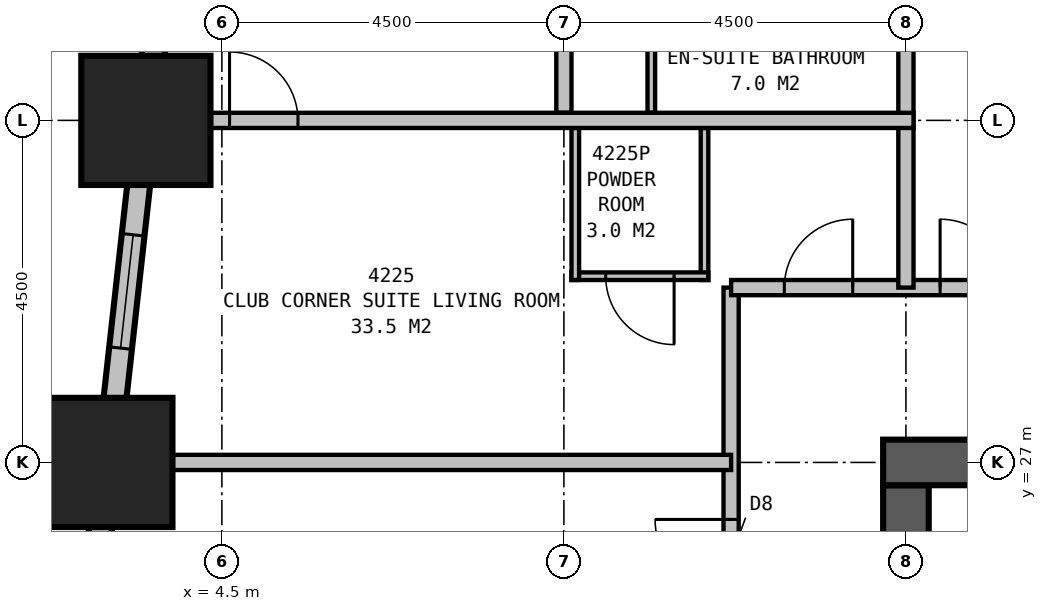
"""IFC4 building model, lengths in metres.
Left out: names, types, materials, properties, quantities, classifications, styles, units other than length and angle.
Written with IfcOpenShell. Run it as: python <this file> out.ifc"""

import sys

from ifc_helpers import new_model, si_unit, direction, frame, frame_2d, origin, origin_2d, place, context, subcontext, project, spatial, rectangle, extrude, element, fill, save


model = new_model("IFC4")
c1 = context("Model", 3, precision=1e-05, world=origin(), true_north=direction((0.0, 1.0)))
c2 = subcontext(c1, "Body", "Model", "MODEL_VIEW")
j1 = project(units=[si_unit("LENGTHUNIT", "METRE"), si_unit("PLANEANGLEUNIT", "RADIAN")], contexts=[c1])
p1 = place(None, origin())
s1 = spatial("IfcSite", under=j1, at=p1, CompositionType="ELEMENT")
p2 = place(p1, origin())
s2 = spatial("IfcBuilding", under=s1, at=p2, CompositionType="ELEMENT")
p3 = place(p2, frame((0.0, 0.0, 165.9)))
s3 = spatial("IfcBuildingStorey", under=s2, at=p3, CompositionType="ELEMENT", Elevation=165.9)
for number, where, z_axis, x_axis in (
    (1, (3.5, 31.5, 0.0), (0.0, 0.0, 1.0), (1.0, 0.0, 0.0)),
    (2, (3.0, 27.0, 0.0), (0.0, 0.0, 1.0), (1.0, 0.0, 0.0)),
):
    element("IfcColumn", number, at=place(p3, frame(where, z_axis=z_axis, x_axis=x_axis)), inside=s3, PredefinedType="COLUMN", context=c2, shape_type="SweptSolid", body=[
        extrude(rectangle(XDim=1.7, YDim=1.7, at=origin_2d()), origin(), (0.0, 0.0, 1.0), 3.5),
    ])
p4 = place(p3, frame((36.3, 27.0, 0.0), z_axis=(0.0, 0.0, 1.0), x_axis=(-1.0, 0.0, 0.0)))
e3 = element("IfcWall", 3, at=p4, inside=s3, PredefinedType="SHEAR", context=c2, shape_type="SweptSolid", body=[
    extrude(rectangle(XDim=23.1, YDim=0.6, at=frame_2d((11.55, 0.0))), origin(), (0.0, 0.0, 1.0), 3.5),
])
p5 = place(p4, frame((17.05, 0.0, 0.0)))
e4 = element("IfcOpeningElement", 4, at=p5, cuts=e3, PredefinedType="OPENING", context=c2, shape_type="SweptSolid", body=[
    extrude(rectangle(XDim=1.0, YDim=2.1, at=frame_2d((0.5, 1.05))), frame((0.0, 0.31, 0.0), z_axis=(0.0, -1.0, 0.0), x_axis=(1.0, 0.0, 0.0)), (0.0, 0.0, 1.0), 0.62),
])
p6 = place(p4, frame((12.05, 0.0, 0.0)))
e5 = element("IfcOpeningElement", 5, at=p6, cuts=e3, PredefinedType="OPENING", context=c2, shape_type="SweptSolid", body=[
    extrude(rectangle(XDim=1.0, YDim=2.1, at=frame_2d((0.5, 1.05))), frame((0.0, 0.31, 0.0), z_axis=(0.0, -1.0, 0.0), x_axis=(1.0, 0.0, 0.0)), (0.0, 0.0, 1.0), 0.62),
])
p7 = place(p4, frame((7.05, 0.0, 0.0)))
e6 = element("IfcOpeningElement", 6, at=p7, cuts=e3, PredefinedType="OPENING", context=c2, shape_type="SweptSolid", body=[
    extrude(rectangle(XDim=1.0, YDim=2.1, at=frame_2d((0.5, 1.05))), frame((0.0, 0.31, 0.0), z_axis=(0.0, -1.0, 0.0), x_axis=(1.0, 0.0, 0.0)), (0.0, 0.0, 1.0), 0.62),
])
p8 = place(p3, frame((13.5, 26.7, 0.0), z_axis=(0.0, 0.0, 1.0), x_axis=(0.0, -1.0, 0.0)))
e7 = element("IfcWall", 7, at=p8, inside=s3, PredefinedType="SHEAR", context=c2, shape_type="SweptSolid", body=[
    extrude(rectangle(XDim=6.7, YDim=0.6, at=frame_2d((3.35, 0.0))), origin(), (0.0, 0.0, 1.0), 3.5),
])
p9 = place(p3, frame((4.017, 36.149, 0.0), z_axis=(0.0, 0.0, 1.0), x_axis=(-0.110433862387, -0.993883475081, 0.0)))
e8 = element("IfcWall", 8, at=p9, inside=s3, PredefinedType="STANDARD", context=c2, shape_type="SweptSolid", body=[
    extrude(rectangle(XDim=22.939, YDim=0.3, at=frame_2d((11.469, 0.0))), origin(), (0.0, 0.0, 1.0), 2.25),
])
p10 = place(p9, frame((1.664, 0.0, 0.5)))
e9 = element("IfcOpeningElement", 9, at=p10, cuts=e8, PredefinedType="OPENING", context=c2, shape_type="SweptSolid", body=[
    extrude(rectangle(XDim=1.5, YDim=1.6, at=frame_2d((0.75, 0.8))), frame((0.0, 0.16, 0.0), z_axis=(0.0, -1.0, 0.0), x_axis=(1.0, 0.0, 0.0)), (0.0, 0.0, 1.0), 0.32),
])
p11 = place(p9, frame((6.192, 0.0, 0.5)))
e10 = element("IfcOpeningElement", 10, at=p11, cuts=e8, PredefinedType="OPENING", context=c2, shape_type="SweptSolid", body=[
    extrude(rectangle(XDim=1.5, YDim=1.6, at=frame_2d((0.75, 0.8))), frame((0.0, 0.16, 0.0), z_axis=(0.0, -1.0, 0.0), x_axis=(1.0, 0.0, 0.0)), (0.0, 0.0, 1.0), 0.32),
])
p12 = place(p9, frame((10.719, 0.0, 0.5)))
e11 = element("IfcOpeningElement", 11, at=p12, cuts=e8, PredefinedType="OPENING", context=c2, shape_type="SweptSolid", body=[
    extrude(rectangle(XDim=1.5, YDim=1.6, at=frame_2d((0.75, 0.8))), frame((0.0, 0.16, 0.0), z_axis=(0.0, -1.0, 0.0), x_axis=(1.0, 0.0, 0.0)), (0.0, 0.0, 1.0), 0.32),
])
p13 = place(p9, frame((15.247, 0.0, 0.5)))
e12 = element("IfcOpeningElement", 12, at=p13, cuts=e8, PredefinedType="OPENING", context=c2, shape_type="SweptSolid", body=[
    extrude(rectangle(XDim=1.5, YDim=1.6, at=frame_2d((0.75, 0.8))), frame((0.0, 0.16, 0.0), z_axis=(0.0, -1.0, 0.0), x_axis=(1.0, 0.0, 0.0)), (0.0, 0.0, 1.0), 0.32),
])
p14 = place(p9, frame((19.775, 0.0, 0.5)))
e13 = element("IfcOpeningElement", 13, at=p14, cuts=e8, PredefinedType="OPENING", context=c2, shape_type="SweptSolid", body=[
    extrude(rectangle(XDim=1.5, YDim=1.6, at=frame_2d((0.75, 0.8))), frame((0.0, 0.16, 0.0), z_axis=(0.0, -1.0, 0.0), x_axis=(1.0, 0.0, 0.0)), (0.0, 0.0, 1.0), 0.32),
])
p15 = place(p3, frame((11.2, 29.3, 0.0), z_axis=(0.0, 0.0, 1.0), x_axis=(1.0, 0.0, 0.0)))
e14 = element("IfcWall", 14, at=p15, inside=s3, PredefinedType="PARTITIONING", context=c2, shape_type="SweptSolid", body=[
    extrude(rectangle(XDim=27.1, YDim=0.2, at=frame_2d((13.55, 0.0))), origin(), (0.0, 0.0, 1.0), 3.25),
])
p16 = place(p15, frame((2.75, 0.0, 0.0)))
e15 = element("IfcOpeningElement", 15, at=p16, cuts=e14, PredefinedType="OPENING", context=c2, shape_type="SweptSolid", body=[
    extrude(rectangle(XDim=0.9, YDim=2.1, at=frame_2d((0.45, 1.05))), frame((0.0, 0.11, 0.0), z_axis=(0.0, -1.0, 0.0), x_axis=(1.0, 0.0, 0.0)), (0.0, 0.0, 1.0), 0.22),
])
p17 = place(p15, frame((9.55, 0.0, 0.0)))
e16 = element("IfcOpeningElement", 16, at=p17, cuts=e14, PredefinedType="OPENING", context=c2, shape_type="SweptSolid", body=[
    extrude(rectangle(XDim=0.9, YDim=2.1, at=frame_2d((0.45, 1.05))), frame((0.0, 0.11, 0.0), z_axis=(0.0, -1.0, 0.0), x_axis=(1.0, 0.0, 0.0)), (0.0, 0.0, 1.0), 0.22),
])
p18 = place(p15, frame((16.25, 0.0, 0.0)))
e17 = element("IfcOpeningElement", 17, at=p18, cuts=e14, PredefinedType="OPENING", context=c2, shape_type="SweptSolid", body=[
    extrude(rectangle(XDim=0.9, YDim=2.1, at=frame_2d((0.45, 1.05))), frame((0.0, 0.11, 0.0), z_axis=(0.0, -1.0, 0.0), x_axis=(1.0, 0.0, 0.0)), (0.0, 0.0, 1.0), 0.22),
])
p19 = place(p15, frame((20.75, 0.0, 0.0)))
e18 = element("IfcOpeningElement", 18, at=p19, cuts=e14, PredefinedType="OPENING", context=c2, shape_type="SweptSolid", body=[
    extrude(rectangle(XDim=0.9, YDim=2.1, at=frame_2d((0.45, 1.05))), frame((0.0, 0.11, 0.0), z_axis=(0.0, -1.0, 0.0), x_axis=(1.0, 0.0, 0.0)), (0.0, 0.0, 1.0), 0.22),
])
p20 = place(p15, frame((25.5, 0.0, 0.0)))
e19 = element("IfcOpeningElement", 19, at=p20, cuts=e14, PredefinedType="OPENING", context=c2, shape_type="SweptSolid", body=[
    extrude(rectangle(XDim=0.9, YDim=2.1, at=frame_2d((0.45, 1.05))), frame((0.0, 0.11, 0.0), z_axis=(0.0, -1.0, 0.0), x_axis=(1.0, 0.0, 0.0)), (0.0, 0.0, 1.0), 0.22),
])
p21 = place(p15, frame((0.7, 0.0, 0.0)))
e20 = element("IfcOpeningElement", 20, at=p21, cuts=e14, PredefinedType="OPENING", context=c2, shape_type="SweptSolid", body=[
    extrude(rectangle(XDim=0.9, YDim=2.1, at=frame_2d((0.45, 1.05))), frame((0.0, 0.11, 0.0), z_axis=(0.0, -1.0, 0.0), x_axis=(1.0, 0.0, 0.0)), (0.0, 0.0, 1.0), 0.22),
])
p22 = place(p3, frame((11.2, 10.6, 0.0), z_axis=(0.0, 0.0, 1.0), x_axis=(0.0, 1.0, 0.0)))
e21 = element("IfcWall", 21, at=p22, inside=s3, PredefinedType="PARTITIONING", context=c2, shape_type="SweptSolid", body=[
    extrude(rectangle(XDim=18.7, YDim=0.2, at=frame_2d((9.35, 0.0))), origin(), (0.0, 0.0, 1.0), 3.25),
])
p23 = place(p22, frame((6.05, 0.0, 0.0)))
e22 = element("IfcOpeningElement", 22, at=p23, cuts=e21, PredefinedType="OPENING", context=c2, shape_type="SweptSolid", body=[
    extrude(rectangle(XDim=0.9, YDim=2.1, at=frame_2d((0.45, 1.05))), frame((0.0, 0.11, 0.0), z_axis=(0.0, -1.0, 0.0), x_axis=(1.0, 0.0, 0.0)), (0.0, 0.0, 1.0), 0.22),
])
p24 = place(p22, frame((10.55, 0.0, 0.0)))
e23 = element("IfcOpeningElement", 23, at=p24, cuts=e21, PredefinedType="OPENING", context=c2, shape_type="SweptSolid", body=[
    extrude(rectangle(XDim=0.9, YDim=2.1, at=frame_2d((0.45, 1.05))), frame((0.0, 0.11, 0.0), z_axis=(0.0, -1.0, 0.0), x_axis=(1.0, 0.0, 0.0)), (0.0, 0.0, 1.0), 0.22),
])
p25 = place(p22, frame((14.65, 0.0, 0.0)))
e24 = element("IfcOpeningElement", 24, at=p25, cuts=e21, PredefinedType="OPENING", context=c2, shape_type="SweptSolid", body=[
    extrude(rectangle(XDim=1.0, YDim=2.1, at=frame_2d((0.5, 1.05))), frame((0.0, 0.11, 0.0), z_axis=(0.0, -1.0, 0.0), x_axis=(1.0, 0.0, 0.0)), (0.0, 0.0, 1.0), 0.22),
])
p26 = place(p3, frame((11.2, 27.0, 0.0), z_axis=(0.0, 0.0, 1.0), x_axis=(-1.0, 0.0, 0.0)))
e25 = element("IfcWall", 25, at=p26, inside=s3, PredefinedType="PARTITIONING", context=c2, shape_type="SweptSolid", body=[
    extrude(rectangle(XDim=7.977, YDim=0.2, at=frame_2d((3.988, 0.0))), origin(), (0.0, 0.0, 1.0), 1.95),
])
p27 = place(p3, frame((13.5, 29.3, 0.0), z_axis=(0.0, 0.0, 1.0), x_axis=(0.0, 1.0, 0.0)))
e26 = element("IfcWall", 26, at=p27, inside=s3, PredefinedType="PARTITIONING", context=c2, shape_type="SweptSolid", body=[
    extrude(rectangle(XDim=11.2, YDim=0.2, at=frame_2d((5.6, 0.0))), origin(), (0.0, 0.0, 1.0), 2.25),
])
p28 = place(p3, frame((13.6, 31.5, 0.0), z_axis=(0.0, 0.0, 1.0), x_axis=(-1.0, 0.0, 0.0)))
e27 = element("IfcWall", 27, at=p28, inside=s3, PredefinedType="PARTITIONING", context=c2, shape_type="SweptSolid", body=[
    extrude(rectangle(XDim=10.099, YDim=0.2, at=frame_2d((5.05, 0.0))), origin(), (0.0, 0.0, 1.0), 3.25),
])
p29 = place(p28, frame((8.999, 0.0, 0.0), z_axis=(0.0, 0.0, 1.0), x_axis=(-1.0, 0.0, 0.0)))
e28 = element("IfcOpeningElement", 28, at=p29, cuts=e27, PredefinedType="OPENING", context=c2, shape_type="SweptSolid", body=[
    extrude(rectangle(XDim=0.9, YDim=2.1, at=frame_2d((0.45, 1.05))), frame((0.0, 0.11, 0.0), z_axis=(0.0, -1.0, 0.0), x_axis=(1.0, 0.0, 0.0)), (0.0, 0.0, 1.0), 0.22),
])
p30 = place(p3, frame((9.15, 31.4, 0.0), z_axis=(0.0, 0.0, 1.0), x_axis=(0.0, -1.0, 0.0)))
e29 = element("IfcWall", 29, at=p30, inside=s3, PredefinedType="PLUMBINGWALL", context=c2, shape_type="SweptSolid", body=[
    extrude(rectangle(XDim=2.0, YDim=0.1, at=frame_2d((1.0, 0.0))), origin(), (0.0, 0.0, 1.0), 2.25),
])
p31 = place(p3, frame((10.85, 31.4, 0.0), z_axis=(0.0, 0.0, 1.0), x_axis=(0.0, -1.0, 0.0)))
e30 = element("IfcWall", 30, at=p31, inside=s3, PredefinedType="PLUMBINGWALL", context=c2, shape_type="SweptSolid", body=[
    extrude(rectangle(XDim=2.0, YDim=0.1, at=frame_2d((1.0, 0.0))), origin(), (0.0, 0.0, 1.0), 3.25),
])
p32 = place(p3, frame((10.9, 29.45, 0.0), z_axis=(0.0, 0.0, 1.0), x_axis=(-1.0, 0.0, 0.0)))
e31 = element("IfcWall", 31, at=p32, inside=s3, PredefinedType="PLUMBINGWALL", context=c2, shape_type="SweptSolid", body=[
    extrude(rectangle(XDim=1.8, YDim=0.1, at=frame_2d((0.9, 0.0))), origin(), (0.0, 0.0, 1.0), 3.25),
])
p33 = place(p32, frame((0.45, 0.0, 0.0)))
e32 = element("IfcOpeningElement", 32, at=p33, cuts=e31, PredefinedType="OPENING", context=c2, shape_type="SweptSolid", body=[
    extrude(rectangle(XDim=0.9, YDim=2.1, at=frame_2d((0.45, 1.05))), frame((0.0, 0.06, 0.0), z_axis=(0.0, -1.0, 0.0), x_axis=(1.0, 0.0, 0.0)), (0.0, 0.0, 1.0), 0.12),
])
p34 = place(p3, frame((9.0, 31.6, 0.0), z_axis=(0.0, 0.0, 1.0), x_axis=(0.0, 1.0, 0.0)))
e33 = element("IfcWall", 33, at=p34, inside=s3, PredefinedType="PARTITIONING", context=c2, shape_type="SweptSolid", body=[
    extrude(rectangle(XDim=4.4, YDim=0.2, at=frame_2d((2.2, 0.0))), origin(), (0.0, 0.0, 1.0), 2.25),
])
p35 = place(p34, frame((2.5, 0.0, 0.0)))
e34 = element("IfcOpeningElement", 34, at=p35, cuts=e33, PredefinedType="OPENING", context=c2, shape_type="SweptSolid", body=[
    extrude(rectangle(XDim=0.9, YDim=2.1, at=frame_2d((0.45, 1.05))), frame((0.0, 0.11, 0.0), z_axis=(0.0, -1.0, 0.0), x_axis=(1.0, 0.0, 0.0)), (0.0, 0.0, 1.0), 0.22),
])
p36 = place(p3, frame((10.15, 31.6, 0.0), z_axis=(0.0, 0.0, 1.0), x_axis=(0.0, 1.0, 0.0)))
e35 = element("IfcWall", 35, at=p36, inside=s3, PredefinedType="PLUMBINGWALL", context=c2, shape_type="SweptSolid", body=[
    extrude(rectangle(XDim=2.3, YDim=0.1, at=frame_2d((1.15, 0.0))), origin(), (0.0, 0.0, 1.0), 3.25),
])
p37 = place(p11, origin())
e36 = element("IfcWindow", 36, at=p37, inside=s3, PartitioningType="SINGLE_PANEL", PredefinedType="WINDOW", context=c2, shape_type="SweptSolid", body=[
    extrude(rectangle(XDim=1.5, YDim=1.6, at=frame_2d((0.75, 0.8))), frame((0.0, 0.03, 0.0), z_axis=(0.0, -1.0, 0.0), x_axis=(1.0, 0.0, 0.0)), (0.0, 0.0, 1.0), 0.06),
])
fill(e10, e36)
p38 = place(p16, origin())
e37 = element("IfcDoor", 37, at=p38, inside=s3, OperationType="SINGLE_SWING_LEFT", PredefinedType="DOOR", context=c2, shape_type="SweptSolid", body=[
    extrude(rectangle(XDim=0.9, YDim=2.1, at=frame_2d((0.45, 1.05))), frame((0.0, 0.025, 0.0), z_axis=(0.0, -1.0, 0.0), x_axis=(1.0, 0.0, 0.0)), (0.0, 0.0, 1.0), 0.05),
])
fill(e15, e37)
p39 = place(p21, origin())
e38 = element("IfcDoor", 38, at=p39, inside=s3, OperationType="SINGLE_SWING_RIGHT", PredefinedType="DOOR", context=c2, shape_type="SweptSolid", body=[
    extrude(rectangle(XDim=0.9, YDim=2.1, at=frame_2d((0.45, 1.05))), frame((0.0, 0.025, 0.0), z_axis=(0.0, -1.0, 0.0), x_axis=(1.0, 0.0, 0.0)), (0.0, 0.0, 1.0), 0.05),
])
fill(e20, e38)
p40 = place(p25, origin())
e39 = element("IfcDoor", 39, at=p40, inside=s3, OperationType="SINGLE_SWING_RIGHT", PredefinedType="DOOR", context=c2, shape_type="SweptSolid", body=[
    extrude(rectangle(XDim=1.0, YDim=2.1, at=frame_2d((0.5, 1.05))), frame((0.0, 0.025, 0.0), z_axis=(0.0, -1.0, 0.0), x_axis=(1.0, 0.0, 0.0)), (0.0, 0.0, 1.0), 0.05),
])
fill(e24, e39)
p41 = place(p29, origin())
e40 = element("IfcDoor", 40, at=p41, inside=s3, OperationType="SINGLE_SWING_LEFT", PredefinedType="DOOR", context=c2, shape_type="SweptSolid", body=[
    extrude(rectangle(XDim=0.9, YDim=2.1, at=frame_2d((0.45, 1.05))), frame((0.0, 0.025, 0.0), z_axis=(0.0, -1.0, 0.0), x_axis=(1.0, 0.0, 0.0)), (0.0, 0.0, 1.0), 0.05),
])
fill(e28, e40)
p42 = place(p33, origin())
e41 = element("IfcDoor", 41, at=p42, inside=s3, OperationType="SINGLE_SWING_LEFT", PredefinedType="DOOR", context=c2, shape_type="SweptSolid", body=[
    extrude(rectangle(XDim=0.9, YDim=2.1, at=frame_2d((0.45, 1.05))), frame((0.0, 0.025, 0.0), z_axis=(0.0, -1.0, 0.0), x_axis=(1.0, 0.0, 0.0)), (0.0, 0.0, 1.0), 0.05),
])
fill(e32, e41)
save(model, sys.argv[1])
